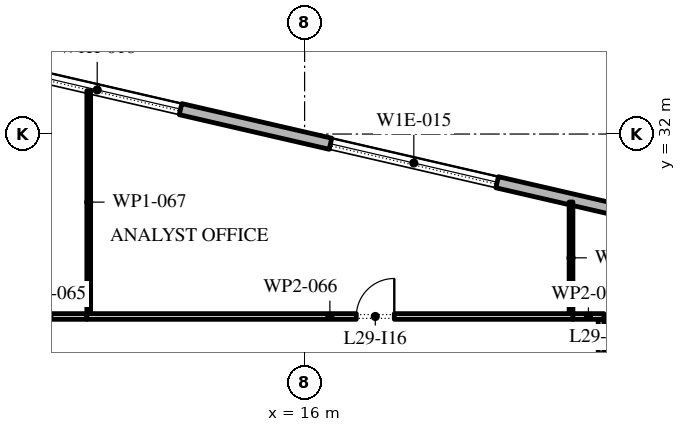
"""IFC4 building model, lengths in metres.
Left out: names, types, materials, properties, quantities, classifications, styles, units other than length and angle.
Written with IfcOpenShell. Run it as: python <this file> out.ifc"""

import sys

from ifc_helpers import new_model, si_unit, direction, frame, frame_2d, origin, place, context, subcontext, project, spatial, rectangle, extrude, element, fill, save


model = new_model("IFC4")
c1 = context("Model", 3, precision=1e-05, world=origin(), true_north=direction((0.0, 1.0)))
c2 = subcontext(c1, "Body", "Model", "MODEL_VIEW")
j1 = project(units=[si_unit("LENGTHUNIT", "METRE"), si_unit("PLANEANGLEUNIT", "RADIAN")], contexts=[c1])
p1 = place(None, origin())
s1 = spatial("IfcSite", under=j1, at=p1, CompositionType="ELEMENT")
p2 = place(p1, origin())
s2 = spatial("IfcBuilding", under=s1, at=p2, CompositionType="ELEMENT")
p3 = place(p2, frame((0.0, 0.0, 135.0)))
s3 = spatial("IfcBuildingStorey", under=s2, at=p3, CompositionType="ELEMENT", Elevation=135.0)
p4 = place(p3, frame((31.078, 28.421, 0.0), z_axis=(0.0, 0.0, 1.0), x_axis=(-0.974370456532, 0.224949357493, 0.0)))
e1 = element("IfcWall", 1, at=p4, inside=s3, PredefinedType="STANDARD", context=c2, shape_type="SweptSolid", body=[
    extrude(rectangle(XDim=51.0, YDim=0.3, at=frame_2d((25.5, 0.0))), origin(), (0.0, 0.0, 1.0), 4.0),
])
p5 = place(p4, frame((1.875, 0.0, 0.45)))
e2 = element("IfcOpeningElement", 2, at=p5, cuts=e1, PredefinedType="OPENING", context=c2, shape_type="SweptSolid", body=[
    extrude(rectangle(XDim=4.5, YDim=2.95, at=frame_2d((2.25, 1.475))), frame((0.0, 0.16, 0.0), z_axis=(0.0, -1.0, 0.0), x_axis=(1.0, 0.0, 0.0)), (0.0, 0.0, 1.0), 0.32),
])
p6 = place(p4, frame((10.275, 0.0, 0.45)))
e3 = element("IfcOpeningElement", 3, at=p6, cuts=e1, PredefinedType="OPENING", context=c2, shape_type="SweptSolid", body=[
    extrude(rectangle(XDim=4.5, YDim=2.825, at=frame_2d((2.25, 1.413))), frame((0.0, 0.16, 0.0), z_axis=(0.0, -1.0, 0.0), x_axis=(1.0, 0.0, 0.0)), (0.0, 0.0, 1.0), 0.32),
])
p7 = place(p4, frame((18.825, 0.0, 0.45)))
e4 = element("IfcOpeningElement", 4, at=p7, cuts=e1, PredefinedType="OPENING", context=c2, shape_type="SweptSolid", body=[
    extrude(rectangle(XDim=4.5, YDim=2.75, at=frame_2d((2.25, 1.375))), frame((0.0, 0.16, 0.0), z_axis=(0.0, -1.0, 0.0), x_axis=(1.0, 0.0, 0.0)), (0.0, 0.0, 1.0), 0.32),
])
p8 = place(p4, frame((27.075, 0.0, 0.0)))
e5 = element("IfcOpeningElement", 5, at=p8, cuts=e1, PredefinedType="OPENING", context=c2, shape_type="SweptSolid", body=[
    extrude(rectangle(XDim=2.4, YDim=3.125, at=frame_2d((1.2, 1.562))), frame((0.0, 0.16, 0.0), z_axis=(0.0, -1.0, 0.0), x_axis=(1.0, 0.0, 0.0)), (0.0, 0.0, 1.0), 0.32),
])
p9 = place(p4, frame((35.925, 0.0, 0.45)))
e6 = element("IfcOpeningElement", 6, at=p9, cuts=e1, PredefinedType="OPENING", context=c2, shape_type="SweptSolid", body=[
    extrude(rectangle(XDim=4.5, YDim=2.575, at=frame_2d((2.25, 1.288))), frame((0.0, 0.16, 0.0), z_axis=(0.0, -1.0, 0.0), x_axis=(1.0, 0.0, 0.0)), (0.0, 0.0, 1.0), 0.32),
])
p10 = place(p4, frame((44.475, 0.0, 0.45)))
e7 = element("IfcOpeningElement", 7, at=p10, cuts=e1, PredefinedType="OPENING", context=c2, shape_type="SweptSolid", body=[
    extrude(rectangle(XDim=4.5, YDim=2.45, at=frame_2d((2.25, 1.225))), frame((0.0, 0.16, 0.0), z_axis=(0.0, -1.0, 0.0), x_axis=(1.0, 0.0, 0.0)), (0.0, 0.0, 1.0), 0.32),
])
p11 = place(p3, frame((8.275, 27.2, 0.0), z_axis=(0.0, 0.0, 1.0), x_axis=(1.0, 0.0, 0.0)))
e8 = element("IfcWall", 8, at=p11, inside=s3, PredefinedType="PARTITIONING", context=c2, shape_type="SweptSolid", body=[
    extrude(rectangle(XDim=1.995, YDim=0.15, at=frame_2d((0.998, 0.0))), origin(), (0.0, 0.0, 1.0), 4.0),
])
p12 = place(p3, frame((10.27, 27.2, 0.0), z_axis=(0.0, 0.0, 1.0), x_axis=(1.0, 0.0, 0.0)))
e9 = element("IfcWall", 9, at=p12, inside=s3, PredefinedType="PARTITIONING", context=c2, shape_type="SweptSolid", body=[
    extrude(rectangle(XDim=12.79, YDim=0.15, at=frame_2d((6.395, 0.0))), origin(), (0.0, 0.0, 1.0), 4.0),
])
p13 = place(p12, frame((7.09, 0.0, 0.0)))
e10 = element("IfcOpeningElement", 10, at=p13, cuts=e9, PredefinedType="OPENING", context=c2, shape_type="SweptSolid", body=[
    extrude(rectangle(XDim=1.0, YDim=2.1, at=frame_2d((0.5, 1.05))), frame((0.0, 0.085, 0.0), z_axis=(0.0, -1.0, 0.0), x_axis=(1.0, 0.0, 0.0)), (0.0, 0.0, 1.0), 0.17),
])
p14 = place(p3, frame((10.32, 33.142, 0.0), z_axis=(0.0, 0.0, 1.0), x_axis=(0.0, -1.0, 0.0)))
e11 = element("IfcWall", 11, at=p14, inside=s3, PredefinedType="PARTITIONING", context=c2, shape_type="SweptSolid", body=[
    extrude(rectangle(XDim=5.867, YDim=0.1, at=frame_2d((2.934, 0.0))), origin(), (0.0, 0.0, 1.0), 4.0),
])
p15 = place(p3, frame((23.06, 27.2, 0.0), z_axis=(0.0, 0.0, 1.0), x_axis=(1.0, 0.0, 0.0)))
e12 = element("IfcWall", 12, at=p15, inside=s3, PredefinedType="PARTITIONING", context=c2, shape_type="SweptSolid", body=[
    extrude(rectangle(XDim=0.815, YDim=0.15, at=frame_2d((0.407, 0.0))), origin(), (0.0, 0.0, 1.0), 4.0),
])
p16 = place(p3, frame((23.01, 30.212, 0.0), z_axis=(0.0, 0.0, 1.0), x_axis=(0.0, -1.0, 0.0)))
e13 = element("IfcWall", 13, at=p16, inside=s3, PredefinedType="PARTITIONING", context=c2, shape_type="SweptSolid", body=[
    extrude(rectangle(XDim=2.937, YDim=0.1, at=frame_2d((1.469, 0.0))), origin(), (0.0, 0.0, 1.0), 4.0),
])
p17 = place(p3, frame((23.8, 27.125, 0.0), z_axis=(0.0, 0.0, 1.0), x_axis=(0.0, -1.0, 0.0)))
e14 = element("IfcWall", 14, at=p17, inside=s3, PredefinedType="PARTITIONING", context=c2, shape_type="SweptSolid", body=[
    extrude(rectangle(XDim=3.665, YDim=0.15, at=frame_2d((1.833, 0.0))), origin(), (0.0, 0.0, 1.0), 4.0),
])
p18 = place(p17, frame((1.065, 0.0, 0.0)))
e15 = element("IfcOpeningElement", 15, at=p18, cuts=e14, PredefinedType="OPENING", context=c2, shape_type="SweptSolid", body=[
    extrude(rectangle(XDim=1.0, YDim=2.1, at=frame_2d((0.5, 1.05))), frame((0.0, 0.085, 0.0), z_axis=(0.0, -1.0, 0.0), x_axis=(1.0, 0.0, 0.0)), (0.0, 0.0, 1.0), 0.17),
])
p19 = place(p6, origin())
e16 = element("IfcWindow", 16, at=p19, inside=s3, PartitioningType="DOUBLE_PANEL_VERTICAL", PredefinedType="WINDOW", context=c2, shape_type="SweptSolid", body=[
    extrude(rectangle(XDim=4.5, YDim=2.825, at=frame_2d((2.25, 1.413))), frame((0.0, 0.03, 0.0), z_axis=(0.0, -1.0, 0.0), x_axis=(1.0, 0.0, 0.0)), (0.0, 0.0, 1.0), 0.06),
])
fill(e3, e16)
p20 = place(p7, origin())
e17 = element("IfcWindow", 17, at=p20, inside=s3, PartitioningType="DOUBLE_PANEL_VERTICAL", PredefinedType="WINDOW", context=c2, shape_type="SweptSolid", body=[
    extrude(rectangle(XDim=4.5, YDim=2.75, at=frame_2d((2.25, 1.375))), frame((0.0, 0.03, 0.0), z_axis=(0.0, -1.0, 0.0), x_axis=(1.0, 0.0, 0.0)), (0.0, 0.0, 1.0), 0.06),
])
fill(e4, e17)
p21 = place(p13, origin())
e18 = element("IfcDoor", 18, at=p21, inside=s3, OperationType="SINGLE_SWING_LEFT", PredefinedType="DOOR", context=c2, shape_type="SweptSolid", body=[
    extrude(rectangle(XDim=1.0, YDim=2.1, at=frame_2d((0.5, 1.05))), frame((0.0, 0.025, 0.0), z_axis=(0.0, -1.0, 0.0), x_axis=(1.0, 0.0, 0.0)), (0.0, 0.0, 1.0), 0.05),
])
fill(e10, e18)
save(model, sys.argv[1])
